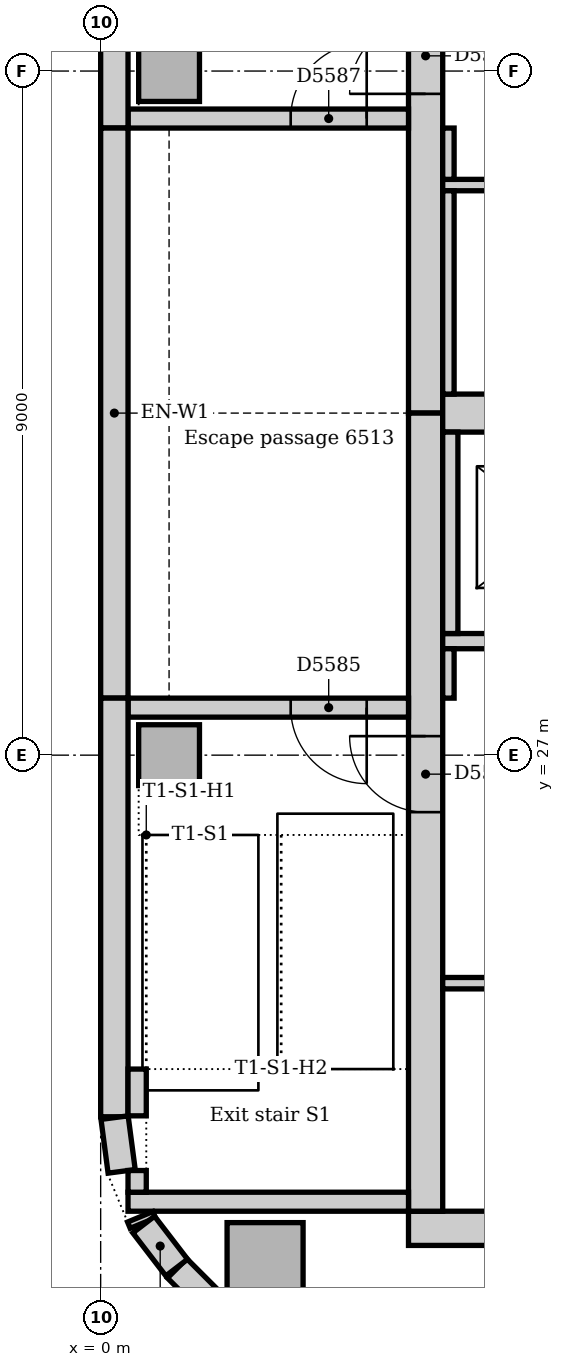
"""IFC4 building model, lengths in metres.
Left out: names, types, materials, properties, quantities, classifications, styles, units other than length and angle.
Written with IfcOpenShell. Run it as: python <this file> out.ifc"""

import sys

from ifc_helpers import new_model, si_unit, direction, frame, frame_2d, origin, origin_2d, place, context, subcontext, project, spatial, rectangle, extrude, element, fill, save


model = new_model("IFC4")
c1 = context("Model", 3, precision=1e-05, world=origin(), true_north=direction((0.0, 1.0)))
c2 = subcontext(c1, "Body", "Model", "MODEL_VIEW")
j1 = project(units=[si_unit("LENGTHUNIT", "METRE"), si_unit("PLANEANGLEUNIT", "RADIAN")], contexts=[c1])
p1 = place(None, origin())
s1 = spatial("IfcSite", under=j1, at=p1, CompositionType="ELEMENT")
p2 = place(p1, origin())
s2 = spatial("IfcBuilding", under=s1, at=p2, CompositionType="ELEMENT")
p3 = place(p2, frame((0.0, 0.0, 271.0)))
s3 = spatial("IfcBuildingStorey", under=s2, at=p3, CompositionType="ELEMENT", Elevation=271.0)
p4 = place(p3, frame((4.05, 20.775, 0.0), z_axis=(0.0, 0.0, 1.0), x_axis=(1.0, 0.0, 0.0)))
e1 = element("IfcWall", 1, at=p4, inside=s3, PredefinedType="SOLIDWALL", context=c2, shape_type="SweptSolid", body=[
    extrude(rectangle(XDim=18.9, YDim=0.45, at=frame_2d((9.45, 0.0))), origin(), (0.0, 0.0, 1.0), 4.0),
])
p5 = place(p3, frame((4.275, 42.0, 0.0), z_axis=(0.0, 0.0, 1.0), x_axis=(0.0, -1.0, 0.0)))
e2 = element("IfcWall", 2, at=p5, inside=s3, PredefinedType="SOLIDWALL", context=c2, shape_type="SweptSolid", body=[
    extrude(rectangle(XDim=10.5, YDim=0.45, at=frame_2d((5.25, 0.0))), origin(), (0.0, 0.0, 1.0), 4.0),
])
p6 = place(p5, frame((5.3, 0.0, 0.0)))
e3 = element("IfcOpeningElement", 3, at=p6, cuts=e2, PredefinedType="OPENING", context=c2, shape_type="SweptSolid", body=[
    extrude(rectangle(XDim=1.0, YDim=2.1, at=frame_2d((0.5, 1.05))), frame((0.0, 0.235, 0.0), z_axis=(0.0, -1.0, 0.0), x_axis=(1.0, 0.0, 0.0)), (0.0, 0.0, 1.0), 0.47),
])
p7 = place(p3, frame((4.275, 31.5, 0.0), z_axis=(0.0, 0.0, 1.0), x_axis=(0.0, -1.0, 0.0)))
e4 = element("IfcWall", 4, at=p7, inside=s3, PredefinedType="SOLIDWALL", context=c2, shape_type="SweptSolid", body=[
    extrude(rectangle(XDim=10.5, YDim=0.45, at=frame_2d((5.25, 0.0))), origin(), (0.0, 0.0, 1.0), 4.0),
])
p8 = place(p7, frame((4.25, 0.0, 0.0)))
e5 = element("IfcOpeningElement", 5, at=p8, cuts=e4, PredefinedType="OPENING", context=c2, shape_type="SweptSolid", body=[
    extrude(rectangle(XDim=1.0, YDim=2.1, at=frame_2d((0.5, 1.05))), frame((0.0, 0.235, 0.0), z_axis=(0.0, -1.0, 0.0), x_axis=(1.0, 0.0, 0.0)), (0.0, 0.0, 1.0), 0.47),
])
p9 = place(p3, frame((4.5, 31.5, 0.0), z_axis=(0.0, 0.0, 1.0), x_axis=(1.0, 0.0, 0.0)))
e6 = element("IfcWall", 6, at=p9, inside=s3, PredefinedType="SOLIDWALL", context=c2, shape_type="SweptSolid", body=[
    extrude(rectangle(XDim=18.0, YDim=0.5, at=frame_2d((9.0, 0.0))), origin(), (0.0, 0.0, 1.0), 4.0),
])
p10 = place(p3, frame((0.36, 21.125, 0.0), z_axis=(0.0, 0.0, 1.0), x_axis=(1.0, 0.0, 0.0)))
e7 = element("IfcWall", 7, at=p10, inside=s3, PredefinedType="SOLIDWALL", context=c2, shape_type="SweptSolid", body=[
    extrude(rectangle(XDim=3.69, YDim=0.25, at=frame_2d((1.845, 0.0))), origin(), (0.0, 0.0, 1.0), 4.0),
])
p11 = place(p3, frame((4.05, 27.625, 0.0), z_axis=(0.0, 0.0, 1.0), x_axis=(-1.0, 0.0, 0.0)))
e8 = element("IfcWall", 8, at=p11, inside=s3, PredefinedType="SOLIDWALL", context=c2, shape_type="SweptSolid", body=[
    extrude(rectangle(XDim=3.69, YDim=0.25, at=frame_2d((1.845, 0.0))), origin(), (0.0, 0.0, 1.0), 4.0),
])
p12 = place(p11, frame((0.55, 0.0, 0.0)))
e9 = element("IfcOpeningElement", 9, at=p12, cuts=e8, PredefinedType="OPENING", context=c2, shape_type="SweptSolid", body=[
    extrude(rectangle(XDim=1.0, YDim=2.1, at=frame_2d((0.5, 1.05))), frame((0.0, 0.135, 0.0), z_axis=(0.0, -1.0, 0.0), x_axis=(1.0, 0.0, 0.0)), (0.0, 0.0, 1.0), 0.27),
])
p13 = place(p3, frame((0.36, 35.375, 0.0), z_axis=(0.0, 0.0, 1.0), x_axis=(1.0, 0.0, 0.0)))
e10 = element("IfcWall", 10, at=p13, inside=s3, PredefinedType="SOLIDWALL", context=c2, shape_type="SweptSolid", body=[
    extrude(rectangle(XDim=3.69, YDim=0.25, at=frame_2d((1.845, 0.0))), origin(), (0.0, 0.0, 1.0), 4.0),
])
p14 = place(p13, frame((2.14, 0.0, 0.0)))
e11 = element("IfcOpeningElement", 11, at=p14, cuts=e10, PredefinedType="OPENING", context=c2, shape_type="SweptSolid", body=[
    extrude(rectangle(XDim=1.0, YDim=2.1, at=frame_2d((0.5, 1.05))), frame((0.0, 0.135, 0.0), z_axis=(0.0, -1.0, 0.0), x_axis=(1.0, 0.0, 0.0)), (0.0, 0.0, 1.0), 0.27),
])
p15 = place(p3, frame((2.163, 20.35, 0.0), z_axis=(0.0, 0.0, 1.0), x_axis=(1.0, 0.0, 0.0)))
e12 = element("IfcColumn", 12, at=p15, inside=s3, PredefinedType="COLUMN", context=c2, shape_type="SweptSolid", body=[
    extrude(rectangle(XDim=1.0, YDim=1.0, at=origin_2d()), origin(), (0.0, 0.0, 1.0), 3.85),
])
for number, where, z_axis, x_axis in (
    (13, (0.9, 27.0, 0.0), (0.0, 0.0, 1.0), (1.0, 0.0, 0.0)),
    (14, (0.9, 36.0, 0.0), (0.0, 0.0, 1.0), (1.0, 0.0, 0.0)),
):
    element("IfcColumn", number, at=place(p3, frame(where, z_axis=z_axis, x_axis=x_axis)), inside=s3, PredefinedType="COLUMN", context=c2, shape_type="SweptSolid", body=[
        extrude(rectangle(XDim=0.8, YDim=0.8, at=origin_2d()), origin(), (0.0, 0.0, 1.0), 4.0),
    ])
p16 = place(p3, frame((0.18, 42.0, 0.0), z_axis=(0.0, 0.0, 1.0), x_axis=(0.0, -1.0, 0.0)))
e15 = element("IfcWall", 15, at=p16, inside=s3, PredefinedType="STANDARD", context=c2, shape_type="SweptSolid", body=[
    extrude(rectangle(XDim=6.75, YDim=0.36, at=frame_2d((3.375, 0.0))), origin(), (0.0, 0.0, 1.0), 3.85),
])
p17 = place(p3, frame((0.18, 35.25, 0.0), z_axis=(0.0, 0.0, 1.0), x_axis=(0.0, -1.0, 0.0)))
e16 = element("IfcWall", 16, at=p17, inside=s3, PredefinedType="STANDARD", context=c2, shape_type="SweptSolid", body=[
    extrude(rectangle(XDim=7.5, YDim=0.36, at=frame_2d((3.75, 0.0))), origin(), (0.0, 0.0, 1.0), 3.85),
])
p18 = place(p3, frame((0.18, 27.75, 0.0), z_axis=(0.0, 0.0, 1.0), x_axis=(0.0, -1.0, 0.0)))
e17 = element("IfcWall", 17, at=p18, inside=s3, PredefinedType="STANDARD", context=c2, shape_type="SweptSolid", body=[
    extrude(rectangle(XDim=5.507, YDim=0.36, at=frame_2d((2.754, 0.0))), origin(), (0.0, 0.0, 1.0), 3.85),
])
p19 = place(p3, frame((1.006, 20.249, 0.0), z_axis=(0.0, 0.0, 1.0), x_axis=(0.707106781187, -0.707106781187, 0.0)))
e18 = element("IfcWall", 18, at=p19, inside=s3, PredefinedType="STANDARD", context=c2, shape_type="SweptSolid", body=[
    extrude(rectangle(XDim=1.757, YDim=0.36, at=frame_2d((0.879, 0.0))), origin(), (0.0, 0.0, 1.0), 3.85),
])
p20 = place(p3, frame((0.183, 22.231, 0.0), z_axis=(0.0, 0.0, 1.0), x_axis=(0.13055608231, -0.99144092581, 0.0)))
e19 = element("IfcWall", 19, at=p20, inside=s3, PredefinedType="STANDARD", context=c2, shape_type="SweptSolid", body=[
    extrude(rectangle(XDim=0.713, YDim=0.36, at=frame_2d((0.356, 0.0))), origin(), (0.0, 0.0, 1.0), 3.85),
])
p21 = place(p3, frame((0.521, 20.927, 0.0), z_axis=(0.0, 0.0, 1.0), x_axis=(0.382549378284, -0.923935048136, 0.0)))
e20 = element("IfcWall", 20, at=p21, inside=s3, PredefinedType="STANDARD", context=c2, shape_type="SweptSolid", body=[
    extrude(rectangle(XDim=0.089, YDim=0.36, at=frame_2d((0.045, 0.0))), origin(), (0.0, 0.0, 1.0), 3.85),
])
p22 = place(p3, frame((0.566, 20.825, 0.0), z_axis=(0.0, 0.0, 1.0), x_axis=(0.608802368033, -0.793321924995, 0.0)))
e21 = element("IfcWall", 21, at=p22, inside=s3, PredefinedType="STANDARD", context=c2, shape_type="SweptSolid", body=[
    extrude(rectangle(XDim=0.713, YDim=0.36, at=frame_2d((0.357, 0.0))), origin(), (0.0, 0.0, 1.0), 3.85),
])
p23 = place(p3, frame((0.48, 21.25, 0.0), z_axis=(0.0, 0.0, 1.0), x_axis=(0.0, 1.0, 0.0)))
e22 = element("IfcWall", 22, at=p23, inside=s3, PredefinedType="STANDARD", context=c2, shape_type="SweptSolid", body=[
    extrude(rectangle(XDim=0.285, YDim=0.24, at=frame_2d((0.143, 0.0))), origin(), (0.0, 0.0, 1.0), 4.0),
])
p24 = place(p3, frame((0.48, 22.255, 0.0), z_axis=(0.0, 0.0, 1.0), x_axis=(0.0, 1.0, 0.0)))
e23 = element("IfcWall", 23, at=p24, inside=s3, PredefinedType="STANDARD", context=c2, shape_type="SweptSolid", body=[
    extrude(rectangle(XDim=0.615, YDim=0.24, at=frame_2d((0.307, 0.0))), origin(), (0.0, 0.0, 1.0), 4.0),
])
p25 = place(p3, frame((4.5, 28.5, 0.0), z_axis=(0.0, 0.0, 1.0), x_axis=(1.0, 0.0, 0.0)))
e24 = element("IfcWall", 24, at=p25, inside=s3, PredefinedType="PARTITIONING", context=c2, shape_type="SweptSolid", body=[
    extrude(rectangle(XDim=18.0, YDim=0.2, at=frame_2d((9.0, 0.0))), origin(), (0.0, 0.0, 1.0), 3.85),
])
p26 = place(p25, frame((0.95, 0.0, 0.0)))
e25 = element("IfcOpeningElement", 25, at=p26, cuts=e24, PredefinedType="OPENING", context=c2, shape_type="SweptSolid", body=[
    extrude(rectangle(XDim=1.1, YDim=2.1, at=frame_2d((0.55, 1.05))), frame((0.0, 0.11, 0.0), z_axis=(0.0, -1.0, 0.0), x_axis=(1.0, 0.0, 0.0)), (0.0, 0.0, 1.0), 0.22),
])
p27 = place(p25, frame((3.95, 0.0, 0.0)))
e26 = element("IfcOpeningElement", 26, at=p27, cuts=e24, PredefinedType="OPENING", context=c2, shape_type="SweptSolid", body=[
    extrude(rectangle(XDim=1.1, YDim=2.1, at=frame_2d((0.55, 1.05))), frame((0.0, 0.11, 0.0), z_axis=(0.0, -1.0, 0.0), x_axis=(1.0, 0.0, 0.0)), (0.0, 0.0, 1.0), 0.22),
])
p28 = place(p25, frame((6.95, 0.0, 0.0)))
e27 = element("IfcOpeningElement", 27, at=p28, cuts=e24, PredefinedType="OPENING", context=c2, shape_type="SweptSolid", body=[
    extrude(rectangle(XDim=1.1, YDim=2.1, at=frame_2d((0.55, 1.05))), frame((0.0, 0.11, 0.0), z_axis=(0.0, -1.0, 0.0), x_axis=(1.0, 0.0, 0.0)), (0.0, 0.0, 1.0), 0.22),
])
p29 = place(p25, frame((9.95, 0.0, 0.0)))
e28 = element("IfcOpeningElement", 28, at=p29, cuts=e24, PredefinedType="OPENING", context=c2, shape_type="SweptSolid", body=[
    extrude(rectangle(XDim=1.1, YDim=2.1, at=frame_2d((0.55, 1.05))), frame((0.0, 0.11, 0.0), z_axis=(0.0, -1.0, 0.0), x_axis=(1.0, 0.0, 0.0)), (0.0, 0.0, 1.0), 0.22),
])
p30 = place(p25, frame((12.95, 0.0, 0.0)))
e29 = element("IfcOpeningElement", 29, at=p30, cuts=e24, PredefinedType="OPENING", context=c2, shape_type="SweptSolid", body=[
    extrude(rectangle(XDim=1.1, YDim=2.1, at=frame_2d((0.55, 1.05))), frame((0.0, 0.11, 0.0), z_axis=(0.0, -1.0, 0.0), x_axis=(1.0, 0.0, 0.0)), (0.0, 0.0, 1.0), 0.22),
])
p31 = place(p25, frame((15.95, 0.0, 0.0)))
e30 = element("IfcOpeningElement", 30, at=p31, cuts=e24, PredefinedType="OPENING", context=c2, shape_type="SweptSolid", body=[
    extrude(rectangle(XDim=1.1, YDim=2.1, at=frame_2d((0.55, 1.05))), frame((0.0, 0.11, 0.0), z_axis=(0.0, -1.0, 0.0), x_axis=(1.0, 0.0, 0.0)), (0.0, 0.0, 1.0), 0.22),
])
p32 = place(p3, frame((4.6, 28.6, 0.0), z_axis=(0.0, 0.0, 1.0), x_axis=(0.0, 1.0, 0.0)))
e31 = element("IfcWall", 31, at=p32, inside=s3, PredefinedType="PARTITIONING", context=c2, shape_type="SweptSolid", body=[
    extrude(rectangle(XDim=2.65, YDim=0.2, at=frame_2d((1.325, 0.0))), origin(), (0.0, 0.0, 1.0), 3.85),
])
p33 = place(p3, frame((4.5, 24.0, 0.0), z_axis=(0.0, 0.0, 1.0), x_axis=(1.0, 0.0, 0.0)))
e32 = element("IfcWall", 32, at=p33, inside=s3, PredefinedType="PARTITIONING", context=c2, shape_type="SweptSolid", body=[
    extrude(rectangle(XDim=18.0, YDim=0.15, at=frame_2d((9.0, 0.0))), origin(), (0.0, 0.0, 1.0), 3.85),
])
p34 = place(p33, frame((4.1, 0.0, 0.0)))
e33 = element("IfcOpeningElement", 33, at=p34, cuts=e32, PredefinedType="OPENING", context=c2, shape_type="SweptSolid", body=[
    extrude(rectangle(XDim=0.9, YDim=2.1, at=frame_2d((0.45, 1.05))), frame((0.0, 0.085, 0.0), z_axis=(0.0, -1.0, 0.0), x_axis=(1.0, 0.0, 0.0)), (0.0, 0.0, 1.0), 0.17),
])
p35 = place(p33, frame((10.8, 0.0, 0.0)))
e34 = element("IfcOpeningElement", 34, at=p35, cuts=e32, PredefinedType="OPENING", context=c2, shape_type="SweptSolid", body=[
    extrude(rectangle(XDim=0.9, YDim=2.1, at=frame_2d((0.45, 1.05))), frame((0.0, 0.085, 0.0), z_axis=(0.0, -1.0, 0.0), x_axis=(1.0, 0.0, 0.0)), (0.0, 0.0, 1.0), 0.17),
])
p36 = place(p33, frame((15.2, 0.0, 0.0)))
e35 = element("IfcOpeningElement", 35, at=p36, cuts=e32, PredefinedType="OPENING", context=c2, shape_type="SweptSolid", body=[
    extrude(rectangle(XDim=0.9, YDim=2.1, at=frame_2d((0.45, 1.05))), frame((0.0, 0.085, 0.0), z_axis=(0.0, -1.0, 0.0), x_axis=(1.0, 0.0, 0.0)), (0.0, 0.0, 1.0), 0.17),
])
p37 = place(p3, frame((4.5, 34.5, 0.0), z_axis=(0.0, 0.0, 1.0), x_axis=(1.0, 0.0, 0.0)))
e36 = element("IfcWall", 36, at=p37, inside=s3, PredefinedType="PARTITIONING", context=c2, shape_type="SweptSolid", body=[
    extrude(rectangle(XDim=5.9, YDim=0.15, at=frame_2d((2.95, 0.0))), origin(), (0.0, 0.0, 1.0), 3.85),
])
p38 = place(p37, frame((1.1, 0.0, 0.0)))
e37 = element("IfcOpeningElement", 37, at=p38, cuts=e36, PredefinedType="OPENING", context=c2, shape_type="SweptSolid", body=[
    extrude(rectangle(XDim=0.9, YDim=2.1, at=frame_2d((0.45, 1.05))), frame((0.0, 0.085, 0.0), z_axis=(0.0, -1.0, 0.0), x_axis=(1.0, 0.0, 0.0)), (0.0, 0.0, 1.0), 0.17),
])
p39 = place(p37, frame((3.9, 0.0, 0.0)))
e38 = element("IfcOpeningElement", 38, at=p39, cuts=e36, PredefinedType="OPENING", context=c2, shape_type="SweptSolid", body=[
    extrude(rectangle(XDim=0.9, YDim=2.1, at=frame_2d((0.45, 1.05))), frame((0.0, 0.085, 0.0), z_axis=(0.0, -1.0, 0.0), x_axis=(1.0, 0.0, 0.0)), (0.0, 0.0, 1.0), 0.17),
])
p40 = place(p3, frame((4.575, 34.575, 0.0), z_axis=(0.0, 0.0, 1.0), x_axis=(0.0, 1.0, 0.0)))
e39 = element("IfcWall", 39, at=p40, inside=s3, PredefinedType="PARTITIONING", context=c2, shape_type="SweptSolid", body=[
    extrude(rectangle(XDim=0.675, YDim=0.15, at=frame_2d((0.338, 0.0))), origin(), (0.0, 0.0, 1.0), 3.85),
])
p41 = place(p3, frame((4.575, 31.75, 0.0), z_axis=(0.0, 0.0, 1.0), x_axis=(0.0, 1.0, 0.0)))
e40 = element("IfcWall", 40, at=p41, inside=s3, PredefinedType="PARTITIONING", context=c2, shape_type="SweptSolid", body=[
    extrude(rectangle(XDim=2.675, YDim=0.15, at=frame_2d((1.337, 0.0))), origin(), (0.0, 0.0, 1.0), 3.85),
])
p42 = place(p3, frame((4.575, 27.75, 0.0), z_axis=(0.0, 0.0, 1.0), x_axis=(0.0, 1.0, 0.0)))
e41 = element("IfcWall", 41, at=p42, inside=s3, PredefinedType="PARTITIONING", context=c2, shape_type="SweptSolid", body=[
    extrude(rectangle(XDim=0.65, YDim=0.15, at=frame_2d((0.325, 0.0))), origin(), (0.0, 0.0, 1.0), 3.85),
])
p43 = place(p8, frame((1.0, 0.0, 0.0), z_axis=(0.0, 0.0, 1.0), x_axis=(-1.0, 0.0, 0.0)))
e42 = element("IfcDoor", 42, at=p43, inside=s3, OperationType="SINGLE_SWING_RIGHT", PredefinedType="DOOR", context=c2, shape_type="SweptSolid", body=[
    extrude(rectangle(XDim=1.0, YDim=2.1, at=frame_2d((0.5, 1.05))), frame((0.0, 0.025, 0.0), z_axis=(0.0, -1.0, 0.0), x_axis=(1.0, 0.0, 0.0)), (0.0, 0.0, 1.0), 0.05),
])
fill(e5, e42)
p44 = place(p12, origin())
e43 = element("IfcDoor", 43, at=p44, inside=s3, OperationType="SINGLE_SWING_LEFT", PredefinedType="DOOR", context=c2, shape_type="SweptSolid", body=[
    extrude(rectangle(XDim=1.0, YDim=2.1, at=frame_2d((0.5, 1.05))), frame((0.0, 0.025, 0.0), z_axis=(0.0, -1.0, 0.0), x_axis=(1.0, 0.0, 0.0)), (0.0, 0.0, 1.0), 0.05),
])
fill(e9, e43)
p45 = place(p6, frame((1.0, 0.0, 0.0), z_axis=(0.0, 0.0, 1.0), x_axis=(-1.0, 0.0, 0.0)))
e44 = element("IfcDoor", 44, at=p45, inside=s3, OperationType="SINGLE_SWING_LEFT", PredefinedType="DOOR", context=c2, shape_type="SweptSolid", body=[
    extrude(rectangle(XDim=1.0, YDim=2.1, at=frame_2d((0.5, 1.05))), frame((0.0, 0.025, 0.0), z_axis=(0.0, -1.0, 0.0), x_axis=(1.0, 0.0, 0.0)), (0.0, 0.0, 1.0), 0.05),
])
fill(e3, e44)
p46 = place(p14, origin())
e45 = element("IfcDoor", 45, at=p46, inside=s3, OperationType="SINGLE_SWING_RIGHT", PredefinedType="DOOR", context=c2, shape_type="SweptSolid", body=[
    extrude(rectangle(XDim=1.0, YDim=2.1, at=frame_2d((0.5, 1.05))), frame((0.0, 0.025, 0.0), z_axis=(0.0, -1.0, 0.0), x_axis=(1.0, 0.0, 0.0)), (0.0, 0.0, 1.0), 0.05),
])
fill(e11, e45)
save(model, sys.argv[1])
